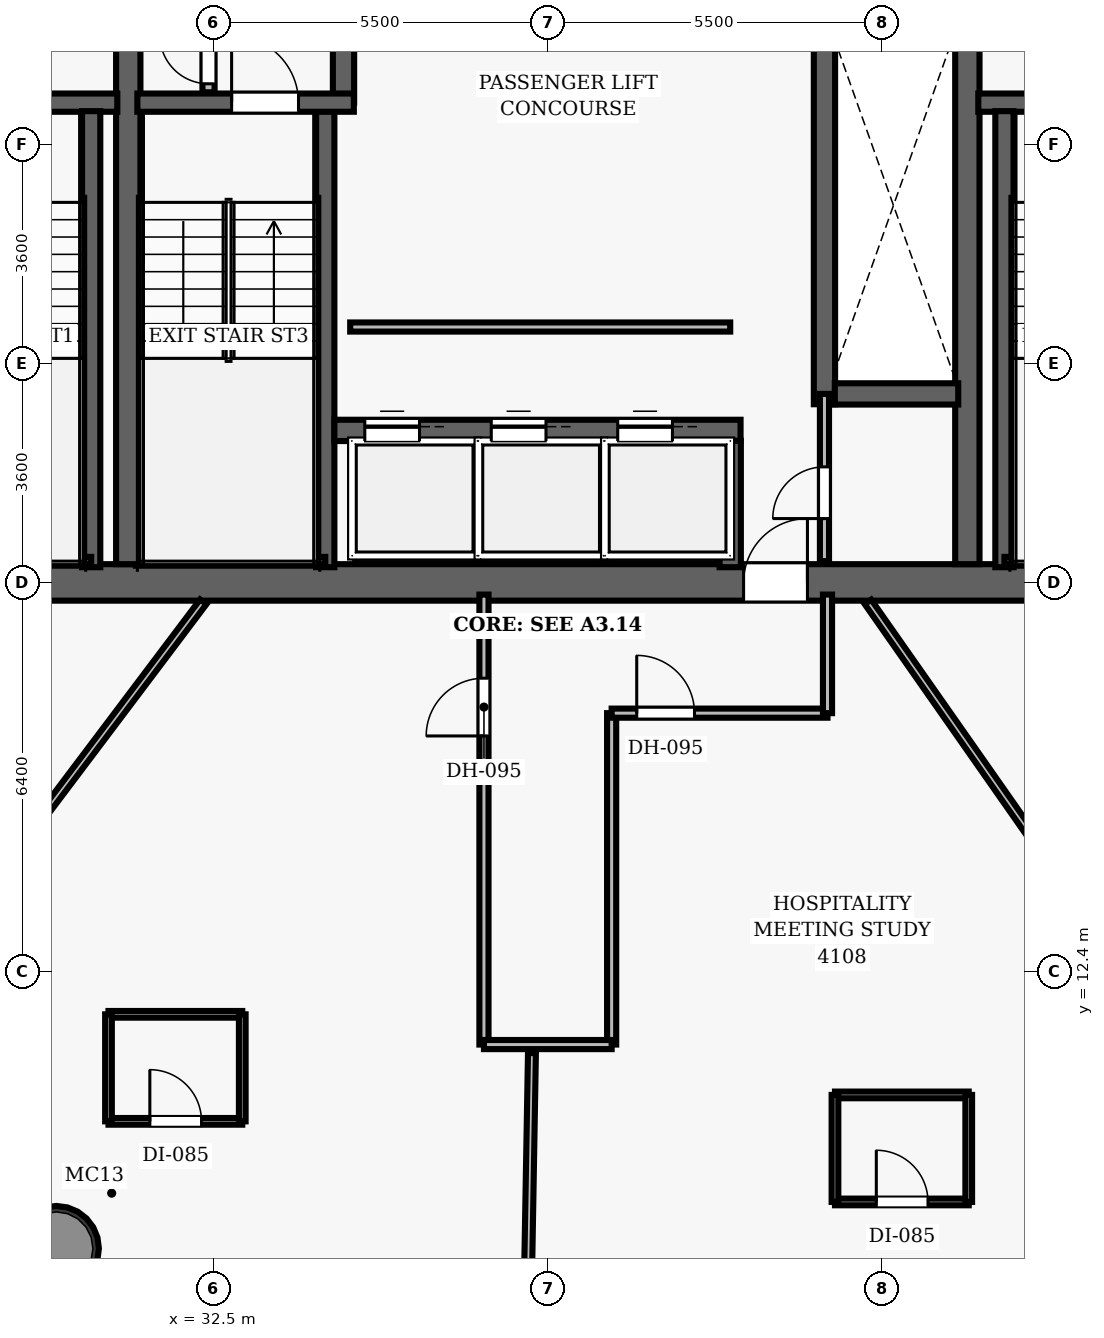
"""IFC4 building model, lengths in metres.
Left out: names, types, materials, properties, quantities, classifications, styles, units other than length and angle.
Written with IfcOpenShell. Run it as: python <this file> out.ifc"""

import sys

from ifc_helpers import new_model, si_unit, direction, frame, frame_2d, origin, origin_2d, place, context, subcontext, project, spatial, rectangle, hollow_circle, extrude, element, fill, save


model = new_model("IFC4")
c1 = context("Model", 3, precision=1e-05, world=origin(), true_north=direction((0.0, 1.0)))
c2 = subcontext(c1, "Body", "Model", "MODEL_VIEW")
j1 = project(units=[si_unit("LENGTHUNIT", "METRE"), si_unit("PLANEANGLEUNIT", "RADIAN")], contexts=[c1])
p1 = place(None, origin())
s1 = spatial("IfcSite", under=j1, at=p1, CompositionType="ELEMENT")
p2 = place(p1, origin())
s2 = spatial("IfcBuilding", under=s1, at=p2, CompositionType="ELEMENT")
p3 = place(p2, frame((0.0, 0.0, 162.3)))
s3 = spatial("IfcBuildingStorey", under=s2, at=p3, CompositionType="ELEMENT", Elevation=162.3)
p4 = place(p3, frame((26.7, 18.8, 0.0), z_axis=(0.0, 0.0, 1.0), x_axis=(1.0, 0.0, 0.0)))
e1 = element("IfcWall", 1, at=p4, inside=s3, PredefinedType="SHEAR", context=c2, shape_type="SweptSolid", body=[
    extrude(rectangle(XDim=22.6, YDim=0.6, at=frame_2d((11.3, 0.0))), origin(), (0.0, 0.0, 1.0), 3.5),
])
p5 = place(p4, frame((14.52, 0.0, 0.0)))
e2 = element("IfcOpeningElement", 2, at=p5, cuts=e1, PredefinedType="OPENING", context=c2, shape_type="SweptSolid", body=[
    extrude(rectangle(XDim=1.05, YDim=2.15, at=frame_2d((0.525, 1.075))), frame((0.0, 0.31, 0.0), z_axis=(0.0, -1.0, 0.0), x_axis=(1.0, 0.0, 0.0)), (0.0, 0.0, 1.0), 0.62),
])
for number, where, z_axis, x_axis in (
    (3, (31.1, 19.1, 0.0), (0.0, 0.0, 1.0), (0.0, 1.0, 0.0)),
    (4, (44.9, 19.1, 0.0), (0.0, 0.0, 1.0), (0.0, 1.0, 0.0)),
):
    element("IfcWall", number, at=place(p3, frame(where, z_axis=z_axis, x_axis=x_axis)), inside=s3, PredefinedType="SHEAR", context=c2, shape_type="SweptSolid", body=[
        extrude(rectangle(XDim=13.8, YDim=0.4, at=frame_2d((6.9, 0.0))), origin(), (0.0, 0.0, 1.0), 3.5),
    ])
p6 = place(p3, frame((29.917, 7.846, 0.0), z_axis=(0.0, 0.0, 1.0), x_axis=(1.0, 0.0, 0.0)))
e5 = element("IfcColumn", 5, at=p6, inside=s3, PredefinedType="COLUMN", context=c2, shape_type="SweptSolid", body=[
    extrude(hollow_circle(Radius=0.7, WallThickness=0.055, at=origin_2d()), origin(), (0.0, 0.0, 1.0), 3.5),
])
p7 = place(p3, frame((27.25, 26.69, 0.0), z_axis=(0.0, 0.0, 1.0), x_axis=(1.0, 0.0, 0.0)))
e6 = element("IfcWall", 6, at=p7, inside=s3, PredefinedType="SHEAR", context=c2, shape_type="SweptSolid", body=[
    extrude(rectangle(XDim=3.67, YDim=0.3, at=frame_2d((1.835, 0.0))), origin(), (0.0, 0.0, 1.0), 3.5),
])
p8 = place(p7, frame((1.05, 0.0, 0.0)))
e7 = element("IfcOpeningElement", 7, at=p8, cuts=e6, PredefinedType="OPENING", context=c2, shape_type="SweptSolid", body=[
    extrude(rectangle(XDim=1.1, YDim=2.15, at=frame_2d((0.55, 1.075))), frame((0.0, 0.16, 0.0), z_axis=(0.0, -1.0, 0.0), x_axis=(1.0, 0.0, 0.0)), (0.0, 0.0, 1.0), 0.32),
])
p9 = place(p3, frame((30.49, 19.05, 0.0), z_axis=(0.0, 0.0, 1.0), x_axis=(0.0, 1.0, 0.0)))
e8 = element("IfcWall", 8, at=p9, inside=s3, PredefinedType="SHEAR", context=c2, shape_type="SweptSolid", body=[
    extrude(rectangle(XDim=7.5, YDim=0.3, at=frame_2d((3.75, 0.0))), origin(), (0.0, 0.0, 1.0), 3.5),
])
p10 = place(p3, frame((27.395, 19.16, 0.0), z_axis=(0.0, 0.0, 1.0), x_axis=(1.0, 0.0, 0.0)))
e9 = element("IfcWall", 9, at=p10, inside=s3, PredefinedType="SHEAR", context=c2, shape_type="SweptSolid", body=[
    extrude(rectangle(XDim=3.095, YDim=0.12, at=frame_2d((1.547, 0.0))), origin(), (0.0, 0.0, 1.0), 3.5),
])
p11 = place(p3, frame((45.08, 26.69, 0.0), z_axis=(0.0, 0.0, 1.0), x_axis=(1.0, 0.0, 0.0)))
e10 = element("IfcWall", 10, at=p11, inside=s3, PredefinedType="SHEAR", context=c2, shape_type="SweptSolid", body=[
    extrude(rectangle(XDim=3.67, YDim=0.3, at=frame_2d((1.835, 0.0))), origin(), (0.0, 0.0, 1.0), 3.5),
])
p12 = place(p11, frame((1.05, 0.0, 0.0)))
e11 = element("IfcOpeningElement", 11, at=p12, cuts=e10, PredefinedType="OPENING", context=c2, shape_type="SweptSolid", body=[
    extrude(rectangle(XDim=1.1, YDim=2.15, at=frame_2d((0.55, 1.075))), frame((0.0, 0.16, 0.0), z_axis=(0.0, -1.0, 0.0), x_axis=(1.0, 0.0, 0.0)), (0.0, 0.0, 1.0), 0.32),
])
p13 = place(p3, frame((45.51, 19.05, 0.0), z_axis=(0.0, 0.0, 1.0), x_axis=(0.0, 1.0, 0.0)))
e12 = element("IfcWall", 12, at=p13, inside=s3, PredefinedType="SHEAR", context=c2, shape_type="SweptSolid", body=[
    extrude(rectangle(XDim=7.5, YDim=0.3, at=frame_2d((3.75, 0.0))), origin(), (0.0, 0.0, 1.0), 3.5),
])
p14 = place(p3, frame((45.51, 19.16, 0.0), z_axis=(0.0, 0.0, 1.0), x_axis=(1.0, 0.0, 0.0)))
e13 = element("IfcWall", 13, at=p14, inside=s3, PredefinedType="SHEAR", context=c2, shape_type="SweptSolid", body=[
    extrude(rectangle(XDim=3.095, YDim=0.12, at=frame_2d((1.547, 0.0))), origin(), (0.0, 0.0, 1.0), 3.5),
])
p15 = place(p3, frame((34.34, 19.05, 0.0), z_axis=(0.0, 0.0, 1.0), x_axis=(0.0, 1.0, 0.0)))
e14 = element("IfcWall", 14, at=p15, inside=s3, PredefinedType="SHEAR", context=c2, shape_type="SweptSolid", body=[
    extrude(rectangle(XDim=7.5, YDim=0.3, at=frame_2d((3.75, 0.0))), origin(), (0.0, 0.0, 1.0), 3.5),
])
p16 = place(p3, frame((34.64, 26.69, 0.0), z_axis=(0.0, 0.0, 1.0), x_axis=(0.0, 1.0, 0.0)))
e15 = element("IfcWall", 15, at=p16, inside=s3, PredefinedType="SHEAR", context=c2, shape_type="SweptSolid", body=[
    extrude(rectangle(XDim=6.26, YDim=0.35, at=frame_2d((3.13, 0.0))), origin(), (0.0, 0.0, 1.0), 3.5),
])
p17 = place(p3, frame((31.25, 26.69, 0.0), z_axis=(0.0, 0.0, 1.0), x_axis=(1.0, 0.0, 0.0)))
e16 = element("IfcWall", 16, at=p17, inside=s3, PredefinedType="SHEAR", context=c2, shape_type="SweptSolid", body=[
    extrude(rectangle(XDim=3.56, YDim=0.3, at=frame_2d((1.78, 0.0))), origin(), (0.0, 0.0, 1.0), 3.5),
])
p18 = place(p17, frame((1.55, 0.0, 0.0)))
e17 = element("IfcOpeningElement", 17, at=p18, cuts=e16, PredefinedType="OPENING", context=c2, shape_type="SweptSolid", body=[
    extrude(rectangle(XDim=1.1, YDim=2.15, at=frame_2d((0.55, 1.075))), frame((0.0, 0.16, 0.0), z_axis=(0.0, -1.0, 0.0), x_axis=(1.0, 0.0, 0.0)), (0.0, 0.0, 1.0), 0.32),
])
p19 = place(p3, frame((31.3, 19.16, 0.0), z_axis=(0.0, 0.0, 1.0), x_axis=(1.0, 0.0, 0.0)))
e18 = element("IfcWall", 18, at=p19, inside=s3, PredefinedType="SHEAR", context=c2, shape_type="SweptSolid", body=[
    extrude(rectangle(XDim=3.04, YDim=0.12, at=frame_2d((1.52, 0.0))), origin(), (0.0, 0.0, 1.0), 3.5),
])
p20 = place(p3, frame((32.42, 26.86, 0.0), z_axis=(0.0, 0.0, 1.0), x_axis=(0.0, 1.0, 0.0)))
e19 = element("IfcWall", 19, at=p20, inside=s3, PredefinedType="PARTITIONING", context=c2, shape_type="SweptSolid", body=[
    extrude(rectangle(XDim=2.04, YDim=0.2, at=frame_2d((1.02, 0.0))), origin(), (0.0, 0.0, 1.0), 2.565),
])
p21 = place(p20, frame((0.14, 0.0, 0.0)))
e20 = element("IfcOpeningElement", 20, at=p21, cuts=e19, PredefinedType="OPENING", context=c2, shape_type="SweptSolid", body=[
    extrude(rectangle(XDim=0.8, YDim=2.05, at=frame_2d((0.4, 1.025))), frame((0.0, 0.11, 0.0), z_axis=(0.0, -1.0, 0.0), x_axis=(1.0, 0.0, 0.0)), (0.0, 0.0, 1.0), 0.22),
])
p22 = place(p3, frame((42.55, 21.73, 0.0), z_axis=(0.0, 0.0, 1.0), x_axis=(0.0, 1.0, 0.0)))
e21 = element("IfcWall", 21, at=p22, inside=s3, PredefinedType="SHEAR", context=c2, shape_type="SweptSolid", body=[
    extrude(rectangle(XDim=6.54, YDim=0.35, at=frame_2d((3.27, 0.0))), origin(), (0.0, 0.0, 1.0), 2.565),
])
p23 = place(p3, frame((42.72, 21.9, 0.0), z_axis=(0.0, 0.0, 1.0), x_axis=(1.0, 0.0, 0.0)))
e22 = element("IfcWall", 22, at=p23, inside=s3, PredefinedType="SHEAR", context=c2, shape_type="SweptSolid", body=[
    extrude(rectangle(XDim=2.03, YDim=0.35, at=frame_2d((1.015, 0.0))), origin(), (0.0, 0.0, 1.0), 2.565),
])
p24 = place(p3, frame((34.49, 21.3, 0.0), z_axis=(0.0, 0.0, 1.0), x_axis=(1.0, 0.0, 0.0)))
e23 = element("IfcWall", 23, at=p24, inside=s3, PredefinedType="SHEAR", context=c2, shape_type="SweptSolid", body=[
    extrude(rectangle(XDim=6.68, YDim=0.35, at=frame_2d((3.34, 0.0))), origin(), (0.0, 0.0, 1.0), 2.565),
])
p25 = place(p24, frame((0.5, 0.0, 0.0)))
e24 = element("IfcOpeningElement", 24, at=p25, cuts=e23, PredefinedType="OPENING", context=c2, shape_type="SweptSolid", body=[
    extrude(rectangle(XDim=0.9, YDim=2.15, at=frame_2d((0.45, 1.075))), frame((0.0, 0.185, 0.0), z_axis=(0.0, -1.0, 0.0), x_axis=(1.0, 0.0, 0.0)), (0.0, 0.0, 1.0), 0.37),
])
p26 = place(p24, frame((2.58, 0.0, 0.0)))
e25 = element("IfcOpeningElement", 25, at=p26, cuts=e23, PredefinedType="OPENING", context=c2, shape_type="SweptSolid", body=[
    extrude(rectangle(XDim=0.9, YDim=2.15, at=frame_2d((0.45, 1.075))), frame((0.0, 0.185, 0.0), z_axis=(0.0, -1.0, 0.0), x_axis=(1.0, 0.0, 0.0)), (0.0, 0.0, 1.0), 0.37),
])
p27 = place(p24, frame((4.66, 0.0, 0.0)))
e26 = element("IfcOpeningElement", 26, at=p27, cuts=e23, PredefinedType="OPENING", context=c2, shape_type="SweptSolid", body=[
    extrude(rectangle(XDim=0.9, YDim=2.15, at=frame_2d((0.45, 1.075))), frame((0.0, 0.185, 0.0), z_axis=(0.0, -1.0, 0.0), x_axis=(1.0, 0.0, 0.0)), (0.0, 0.0, 1.0), 0.37),
])
p28 = place(p3, frame((41.0, 19.05, 0.0), z_axis=(0.0, 0.0, 1.0), x_axis=(0.0, 1.0, 0.0)))
e27 = element("IfcWall", 27, at=p28, inside=s3, PredefinedType="SHEAR", context=c2, shape_type="SweptSolid", body=[
    extrude(rectangle(XDim=2.08, YDim=0.35, at=frame_2d((1.04, 0.0))), origin(), (0.0, 0.0, 1.0), 2.565),
])
p29 = place(p3, frame((34.75, 23.0, 0.0), z_axis=(0.0, 0.0, 1.0), x_axis=(1.0, 0.0, 0.0)))
e28 = element("IfcWall", 28, at=p29, inside=s3, PredefinedType="PARTITIONING", context=c2, shape_type="SweptSolid", body=[
    extrude(rectangle(XDim=6.25, YDim=0.15, at=frame_2d((3.125, 0.0))), origin(), (0.0, 0.0, 1.0), 2.565),
])
p30 = place(p3, frame((42.55, 19.15, 0.0), z_axis=(0.0, 0.0, 1.0), x_axis=(0.0, 1.0, 0.0)))
e29 = element("IfcWall", 29, at=p30, inside=s3, PredefinedType="PARTITIONING", context=c2, shape_type="SweptSolid", body=[
    extrude(rectangle(XDim=2.75, YDim=0.15, at=frame_2d((1.375, 0.0))), origin(), (0.0, 0.0, 1.0), 2.565),
])
p31 = place(p30, frame((0.7, 0.0, 0.0)))
e30 = element("IfcOpeningElement", 30, at=p31, cuts=e29, PredefinedType="OPENING", context=c2, shape_type="SweptSolid", body=[
    extrude(rectangle(XDim=0.85, YDim=2.1, at=frame_2d((0.425, 1.05))), frame((0.0, 0.085, 0.0), z_axis=(0.0, -1.0, 0.0), x_axis=(1.0, 0.0, 0.0)), (0.0, 0.0, 1.0), 0.17),
])
p32 = place(p3, frame((36.95, 11.2, 0.0), z_axis=(0.0, 0.0, 1.0), x_axis=(0.0, 1.0, 0.0)))
e31 = element("IfcWall", 31, at=p32, inside=s3, PredefinedType="PARTITIONING", context=c2, shape_type="SweptSolid", body=[
    extrude(rectangle(XDim=7.4, YDim=0.15, at=frame_2d((3.7, 0.0))), origin(), (0.0, 0.0, 1.0), 2.565),
])
p33 = place(p32, frame((5.075, 0.0, 0.0)))
e32 = element("IfcOpeningElement", 32, at=p33, cuts=e31, PredefinedType="OPENING", context=c2, shape_type="SweptSolid", body=[
    extrude(rectangle(XDim=0.95, YDim=2.15, at=frame_2d((0.475, 1.075))), frame((0.0, 0.085, 0.0), z_axis=(0.0, -1.0, 0.0), x_axis=(1.0, 0.0, 0.0)), (0.0, 0.0, 1.0), 0.17),
])
p34 = place(p3, frame((39.05, 11.2, 0.0), z_axis=(0.0, 0.0, 1.0), x_axis=(0.0, 1.0, 0.0)))
e33 = element("IfcWall", 33, at=p34, inside=s3, PredefinedType="PARTITIONING", context=c2, shape_type="SweptSolid", body=[
    extrude(rectangle(XDim=5.45, YDim=0.15, at=frame_2d((2.725, 0.0))), origin(), (0.0, 0.0, 1.0), 2.565),
])
p35 = place(p3, frame((39.05, 16.65, 0.0), z_axis=(0.0, 0.0, 1.0), x_axis=(1.0, 0.0, 0.0)))
e34 = element("IfcWall", 34, at=p35, inside=s3, PredefinedType="PARTITIONING", context=c2, shape_type="SweptSolid", body=[
    extrude(rectangle(XDim=3.55, YDim=0.15, at=frame_2d((1.775, 0.0))), origin(), (0.0, 0.0, 1.0), 2.565),
])
p36 = place(p35, frame((0.413, 0.0, 0.0)))
e35 = element("IfcOpeningElement", 35, at=p36, cuts=e34, PredefinedType="OPENING", context=c2, shape_type="SweptSolid", body=[
    extrude(rectangle(XDim=0.95, YDim=2.15, at=frame_2d((0.475, 1.075))), frame((0.0, 0.085, 0.0), z_axis=(0.0, -1.0, 0.0), x_axis=(1.0, 0.0, 0.0)), (0.0, 0.0, 1.0), 0.17),
])
p37 = place(p3, frame((42.6, 16.65, 0.0), z_axis=(0.0, 0.0, 1.0), x_axis=(0.0, 1.0, 0.0)))
e36 = element("IfcWall", 36, at=p37, inside=s3, PredefinedType="PARTITIONING", context=c2, shape_type="SweptSolid", body=[
    extrude(rectangle(XDim=1.95, YDim=0.15, at=frame_2d((0.975, 0.0))), origin(), (0.0, 0.0, 1.0), 2.565),
])
p38 = place(p3, frame((36.95, 11.2, 0.0), z_axis=(0.0, 0.0, 1.0), x_axis=(1.0, 0.0, 0.0)))
e37 = element("IfcWall", 37, at=p38, inside=s3, PredefinedType="PARTITIONING", context=c2, shape_type="SweptSolid", body=[
    extrude(rectangle(XDim=2.1, YDim=0.15, at=frame_2d((1.05, 0.0))), origin(), (0.0, 0.0, 1.0), 2.565),
])
p39 = place(p3, frame((32.333, 18.48, 0.0), z_axis=(0.0, 0.0, 1.0), x_axis=(-0.601812874522, -0.798637129151, 0.0)))
e38 = element("IfcWall", 38, at=p39, inside=s3, PredefinedType="PARTITIONING", context=c2, shape_type="SweptSolid", body=[
    extrude(rectangle(XDim=13.649, YDim=0.13, at=frame_2d((6.825, 0.0))), origin(), (0.0, 0.0, 1.0), 2.565),
])
p40 = place(p3, frame((37.739, 11.06, 0.0), z_axis=(0.0, 0.0, 1.0), x_axis=(-0.017448535387, -0.999847762718, 0.0)))
e39 = element("IfcWall", 39, at=p40, inside=s3, PredefinedType="PARTITIONING", context=c2, shape_type="SweptSolid", body=[
    extrude(rectangle(XDim=8.367, YDim=0.13, at=frame_2d((4.184, 0.0))), origin(), (0.0, 0.0, 1.0), 2.565),
])
p41 = place(p3, frame((43.266, 18.48, 0.0), z_axis=(0.0, 0.0, 1.0), x_axis=(0.57357232701, -0.819154921665, 0.0)))
e40 = element("IfcWall", 40, at=p41, inside=s3, PredefinedType="PARTITIONING", context=c2, shape_type="SweptSolid", body=[
    extrude(rectangle(XDim=17.281, YDim=0.13, at=frame_2d((8.641, 0.0))), origin(), (0.0, 0.0, 1.0), 2.565),
])
p42 = place(p3, frame((30.775, 9.937, 0.0), z_axis=(0.0, 0.0, 1.0), x_axis=(1.0, 0.0, 0.0)))
e41 = element("IfcWall", 41, at=p42, inside=s3, PredefinedType="PARTITIONING", context=c2, shape_type="SweptSolid", body=[
    extrude(rectangle(XDim=2.2, YDim=0.11, at=frame_2d((1.1, 0.0))), origin(), (0.0, 0.0, 1.0), 2.565),
])
p43 = place(p42, frame((0.68, 0.0, 0.0)))
e42 = element("IfcOpeningElement", 42, at=p43, cuts=e41, PredefinedType="OPENING", context=c2, shape_type="SweptSolid", body=[
    extrude(rectangle(XDim=0.85, YDim=2.1, at=frame_2d((0.425, 1.05))), frame((0.0, 0.065, 0.0), z_axis=(0.0, -1.0, 0.0), x_axis=(1.0, 0.0, 0.0)), (0.0, 0.0, 1.0), 0.13),
])
p44 = place(p3, frame((30.775, 11.697, 0.0), z_axis=(0.0, 0.0, 1.0), x_axis=(1.0, 0.0, 0.0)))
e43 = element("IfcWall", 43, at=p44, inside=s3, PredefinedType="PARTITIONING", context=c2, shape_type="SweptSolid", body=[
    extrude(rectangle(XDim=2.2, YDim=0.11, at=frame_2d((1.1, 0.0))), origin(), (0.0, 0.0, 1.0), 2.565),
])
for number, where, z_axis, x_axis in (
    (44, (30.775, 9.937, 0.0), (0.0, 0.0, 1.0), (0.0, 1.0, 0.0)),
    (45, (32.975, 9.937, 0.0), (0.0, 0.0, 1.0), (0.0, 1.0, 0.0)),
):
    element("IfcWall", number, at=place(p3, frame(where, z_axis=z_axis, x_axis=x_axis)), inside=s3, PredefinedType="PARTITIONING", context=c2, shape_type="SweptSolid", body=[
        extrude(rectangle(XDim=1.76, YDim=0.11, at=frame_2d((0.88, 0.0))), origin(), (0.0, 0.0, 1.0), 2.565),
    ])
p45 = place(p3, frame((42.723, 8.612, 0.0), z_axis=(0.0, 0.0, 1.0), x_axis=(1.0, 0.0, 0.0)))
e46 = element("IfcWall", 46, at=p45, inside=s3, PredefinedType="PARTITIONING", context=c2, shape_type="SweptSolid", body=[
    extrude(rectangle(XDim=2.2, YDim=0.11, at=frame_2d((1.1, 0.0))), origin(), (0.0, 0.0, 1.0), 2.565),
])
p46 = place(p45, frame((0.68, 0.0, 0.0)))
e47 = element("IfcOpeningElement", 47, at=p46, cuts=e46, PredefinedType="OPENING", context=c2, shape_type="SweptSolid", body=[
    extrude(rectangle(XDim=0.85, YDim=2.1, at=frame_2d((0.425, 1.05))), frame((0.0, 0.065, 0.0), z_axis=(0.0, -1.0, 0.0), x_axis=(1.0, 0.0, 0.0)), (0.0, 0.0, 1.0), 0.13),
])
p47 = place(p3, frame((42.723, 10.372, 0.0), z_axis=(0.0, 0.0, 1.0), x_axis=(1.0, 0.0, 0.0)))
e48 = element("IfcWall", 48, at=p47, inside=s3, PredefinedType="PARTITIONING", context=c2, shape_type="SweptSolid", body=[
    extrude(rectangle(XDim=2.2, YDim=0.11, at=frame_2d((1.1, 0.0))), origin(), (0.0, 0.0, 1.0), 2.565),
])
for number, where, z_axis, x_axis in (
    (49, (42.723, 8.612, 0.0), (0.0, 0.0, 1.0), (0.0, 1.0, 0.0)),
    (50, (44.923, 8.612, 0.0), (0.0, 0.0, 1.0), (0.0, 1.0, 0.0)),
):
    element("IfcWall", number, at=place(p3, frame(where, z_axis=z_axis, x_axis=x_axis)), inside=s3, PredefinedType="PARTITIONING", context=c2, shape_type="SweptSolid", body=[
        extrude(rectangle(XDim=1.76, YDim=0.11, at=frame_2d((0.88, 0.0))), origin(), (0.0, 0.0, 1.0), 2.565),
    ])
p48 = place(p18, origin())
e51 = element("IfcDoor", 51, at=p48, inside=s3, OperationType="SINGLE_SWING_LEFT", PredefinedType="DOOR", context=c2, shape_type="SweptSolid", body=[
    extrude(rectangle(XDim=1.1, YDim=2.15, at=frame_2d((0.55, 1.075))), frame((0.0, 0.025, 0.0), z_axis=(0.0, -1.0, 0.0), x_axis=(1.0, 0.0, 0.0)), (0.0, 0.0, 1.0), 0.05),
])
fill(e17, e51)
p49 = place(p21, origin())
e52 = element("IfcDoor", 52, at=p49, inside=s3, OperationType="SINGLE_SWING_RIGHT", PredefinedType="DOOR", context=c2, shape_type="SweptSolid", body=[
    extrude(rectangle(XDim=0.8, YDim=2.05, at=frame_2d((0.4, 1.025))), frame((0.0, 0.025, 0.0), z_axis=(0.0, -1.0, 0.0), x_axis=(1.0, 0.0, 0.0)), (0.0, 0.0, 1.0), 0.05),
])
fill(e20, e52)
p50 = place(p5, origin())
e53 = element("IfcDoor", 53, at=p50, inside=s3, OperationType="SINGLE_SWING_RIGHT", PredefinedType="DOOR", context=c2, shape_type="SweptSolid", body=[
    extrude(rectangle(XDim=1.05, YDim=2.15, at=frame_2d((0.525, 1.075))), frame((0.0, 0.025, 0.0), z_axis=(0.0, -1.0, 0.0), x_axis=(1.0, 0.0, 0.0)), (0.0, 0.0, 1.0), 0.05),
])
fill(e2, e53)
p51 = place(p31, origin())
e54 = element("IfcDoor", 54, at=p51, inside=s3, OperationType="SINGLE_SWING_LEFT", PredefinedType="DOOR", context=c2, shape_type="SweptSolid", body=[
    extrude(rectangle(XDim=0.85, YDim=2.1, at=frame_2d((0.425, 1.05))), frame((0.0, 0.025, 0.0), z_axis=(0.0, -1.0, 0.0), x_axis=(1.0, 0.0, 0.0)), (0.0, 0.0, 1.0), 0.05),
])
fill(e30, e54)
p52 = place(p33, origin())
e55 = element("IfcDoor", 55, at=p52, inside=s3, OperationType="SINGLE_SWING_LEFT", PredefinedType="DOOR", context=c2, shape_type="SweptSolid", body=[
    extrude(rectangle(XDim=0.95, YDim=2.15, at=frame_2d((0.475, 1.075))), frame((0.0, 0.025, 0.0), z_axis=(0.0, -1.0, 0.0), x_axis=(1.0, 0.0, 0.0)), (0.0, 0.0, 1.0), 0.05),
])
fill(e32, e55)
p53 = place(p43, origin())
e56 = element("IfcDoor", 56, at=p53, inside=s3, OperationType="SINGLE_SWING_LEFT", PredefinedType="DOOR", context=c2, shape_type="SweptSolid", body=[
    extrude(rectangle(XDim=0.85, YDim=2.1, at=frame_2d((0.425, 1.05))), frame((0.0, 0.025, 0.0), z_axis=(0.0, -1.0, 0.0), x_axis=(1.0, 0.0, 0.0)), (0.0, 0.0, 1.0), 0.05),
])
fill(e42, e56)
p54 = place(p36, origin())
e57 = element("IfcDoor", 57, at=p54, inside=s3, OperationType="SINGLE_SWING_LEFT", PredefinedType="DOOR", context=c2, shape_type="SweptSolid", body=[
    extrude(rectangle(XDim=0.95, YDim=2.15, at=frame_2d((0.475, 1.075))), frame((0.0, 0.025, 0.0), z_axis=(0.0, -1.0, 0.0), x_axis=(1.0, 0.0, 0.0)), (0.0, 0.0, 1.0), 0.05),
])
fill(e35, e57)
p55 = place(p46, origin())
e58 = element("IfcDoor", 58, at=p55, inside=s3, OperationType="SINGLE_SWING_LEFT", PredefinedType="DOOR", context=c2, shape_type="SweptSolid", body=[
    extrude(rectangle(XDim=0.85, YDim=2.1, at=frame_2d((0.425, 1.05))), frame((0.0, 0.025, 0.0), z_axis=(0.0, -1.0, 0.0), x_axis=(1.0, 0.0, 0.0)), (0.0, 0.0, 1.0), 0.05),
])
fill(e47, e58)
p56 = place(p25, origin())
e59 = element("IfcDoor", 59, at=p56, inside=s3, OperationType="SLIDING_TO_LEFT", PredefinedType="DOOR", context=c2, shape_type="SweptSolid", body=[
    extrude(rectangle(XDim=0.9, YDim=2.15, at=frame_2d((0.45, 1.075))), frame((0.0, 0.025, 0.0), z_axis=(0.0, -1.0, 0.0), x_axis=(1.0, 0.0, 0.0)), (0.0, 0.0, 1.0), 0.05),
])
fill(e24, e59)
p57 = place(p26, origin())
e60 = element("IfcDoor", 60, at=p57, inside=s3, OperationType="SLIDING_TO_LEFT", PredefinedType="DOOR", context=c2, shape_type="SweptSolid", body=[
    extrude(rectangle(XDim=0.9, YDim=2.15, at=frame_2d((0.45, 1.075))), frame((0.0, 0.025, 0.0), z_axis=(0.0, -1.0, 0.0), x_axis=(1.0, 0.0, 0.0)), (0.0, 0.0, 1.0), 0.05),
])
fill(e25, e60)
p58 = place(p27, origin())
e61 = element("IfcDoor", 61, at=p58, inside=s3, OperationType="SLIDING_TO_LEFT", PredefinedType="DOOR", context=c2, shape_type="SweptSolid", body=[
    extrude(rectangle(XDim=0.9, YDim=2.15, at=frame_2d((0.45, 1.075))), frame((0.0, 0.025, 0.0), z_axis=(0.0, -1.0, 0.0), x_axis=(1.0, 0.0, 0.0)), (0.0, 0.0, 1.0), 0.05),
])
fill(e26, e61)
save(model, sys.argv[1])
